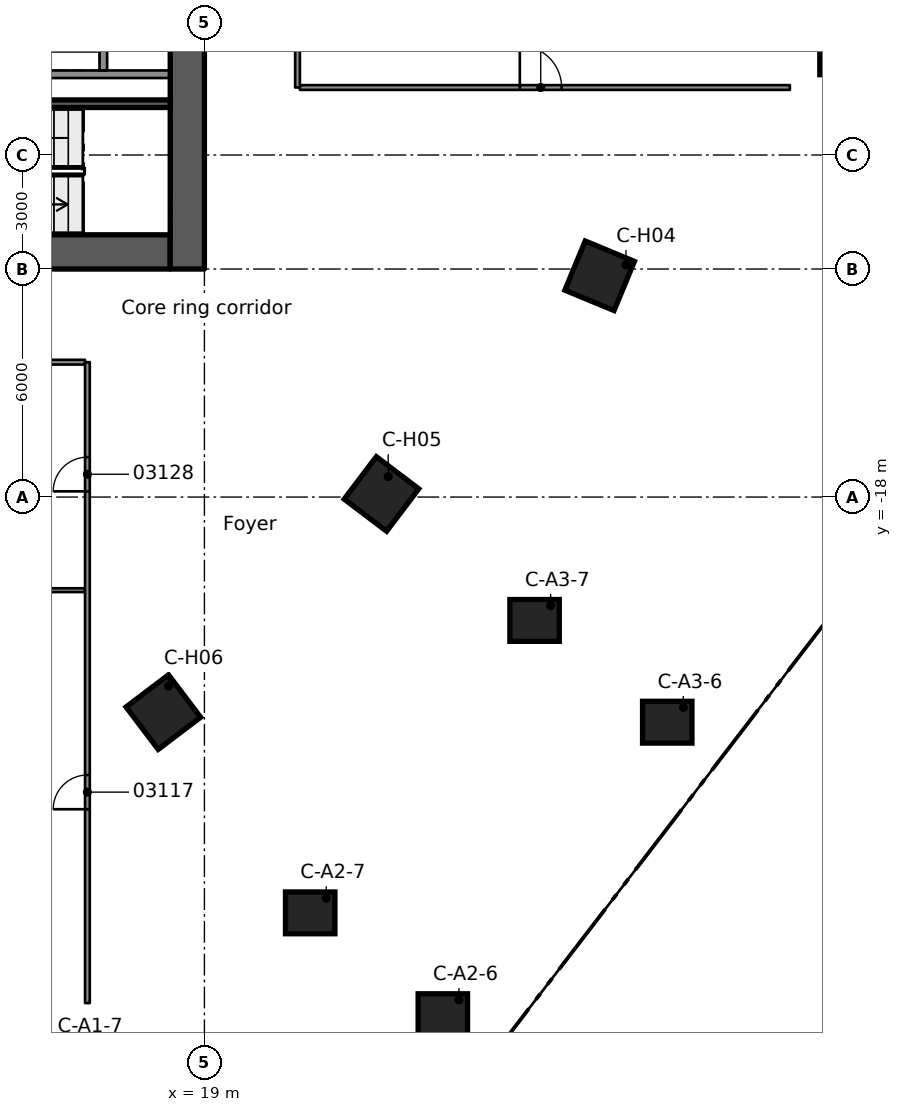
"""IFC4 building model, lengths in metres.
Left out: names, types, materials, properties, quantities, classifications, styles, units other than length and angle.
Written with IfcOpenShell. Run it as: python <this file> out.ifc"""

import sys

from ifc_helpers import new_model, si_unit, direction, frame, frame_2d, origin, origin_2d, place, context, subcontext, project, spatial, rectangle, extrude, element, fill, save


model = new_model("IFC4")
c1 = context("Model", 3, precision=1e-05, world=origin(), true_north=direction((0.0, 1.0)))
c2 = subcontext(c1, "Body", "Model", "MODEL_VIEW")
j1 = project(units=[si_unit("LENGTHUNIT", "METRE"), si_unit("PLANEANGLEUNIT", "RADIAN")], contexts=[c1])
p1 = place(None, origin())
s1 = spatial("IfcSite", under=j1, at=p1, CompositionType="ELEMENT")
p2 = place(p1, origin())
s2 = spatial("IfcBuilding", under=s1, at=p2, CompositionType="ELEMENT")
p3 = place(p2, frame((0.0, 0.0, 15.5)))
s3 = spatial("IfcBuildingStorey", under=s2, at=p3, CompositionType="ELEMENT", Elevation=15.5)
p4 = place(p3, frame((8.9, -11.55, 0.0), z_axis=(0.0, 0.0, 1.0), x_axis=(1.0, 0.0, 0.0)))
e1 = element("IfcWall", 1, at=p4, inside=s3, PredefinedType="SHEAR", context=c2, shape_type="SweptSolid", body=[
    extrude(rectangle(XDim=9.2, YDim=0.9, at=frame_2d((4.6, 0.0))), origin(), (0.0, 0.0, 1.0), 5.0),
])
p5 = place(p4, frame((3.0, 0.0, 0.0)))
e2 = element("IfcOpeningElement", 2, at=p5, cuts=e1, PredefinedType="OPENING", context=c2, shape_type="SweptSolid", body=[
    extrude(rectangle(XDim=1.1, YDim=2.1, at=frame_2d((0.55, 1.05))), frame((0.0, 0.46, 0.0), z_axis=(0.0, -1.0, 0.0), x_axis=(1.0, 0.0, 0.0)), (0.0, 0.0, 1.0), 0.92),
])
p6 = place(p3, frame((18.55, -12.0, 0.0), z_axis=(0.0, 0.0, 1.0), x_axis=(0.0, 1.0, 0.0)))
e3 = element("IfcWall", 3, at=p6, inside=s3, PredefinedType="SHEAR", context=c2, shape_type="SweptSolid", body=[
    extrude(rectangle(XDim=24.0, YDim=0.9, at=frame_2d((12.0, 0.0))), origin(), (0.0, 0.0, 1.0), 5.0),
])
p7 = place(p6, frame((12.1, 0.0, 0.0)))
e4 = element("IfcOpeningElement", 4, at=p7, cuts=e3, PredefinedType="OPENING", context=c2, shape_type="SweptSolid", body=[
    extrude(rectangle(XDim=1.8, YDim=2.1, at=frame_2d((0.9, 1.05))), frame((0.0, 0.46, 0.0), z_axis=(0.0, -1.0, 0.0), x_axis=(1.0, 0.0, 0.0)), (0.0, 0.0, 1.0), 0.92),
])
for number, where, z_axis, x_axis in (
    (5, (25.274, -31.62, 0.0), (0.0, 0.0, 1.0), (1.0, 0.0, 0.0)),
    (6, (21.783, -28.941, 0.0), (0.0, 0.0, 1.0), (1.0, 0.0, 0.0)),
    (7, (31.179, -23.924, 0.0), (0.0, 0.0, 1.0), (1.0, 0.0, 0.0)),
    (8, (27.688, -21.246, 0.0), (0.0, 0.0, 1.0), (1.0, 0.0, 0.0)),
    (9, (35.843, -6.336, 0.0), (0.0, 0.0, 1.0), (1.0, 0.0, 0.0)),
):
    element("IfcColumn", number, at=place(p3, frame(where, z_axis=z_axis, x_axis=x_axis)), inside=s3, PredefinedType="COLUMN", context=c2, shape_type="SweptSolid", body=[
        extrude(rectangle(XDim=1.3, YDim=1.1, at=origin_2d()), origin(), (0.0, 0.0, 1.0), 5.0),
    ])
for number, where, z_axis, x_axis in (
    (10, (29.4, -12.178, 0.0), (0.0, 0.0, 1.0), (0.924, -0.383, 0.0)),
    (11, (23.659, -17.919, 0.0), (0.0, 0.0, 1.0), (0.797, -0.604, 0.0)),
    (12, (17.919, -23.659, 0.0), (0.0, 0.0, 1.0), (0.604, -0.797, 0.0)),
):
    element("IfcColumn", number, at=place(p3, frame(where, z_axis=z_axis, x_axis=x_axis)), inside=s3, PredefinedType="COLUMN", context=c2, shape_type="SweptSolid", body=[
        extrude(rectangle(XDim=1.4, YDim=1.4, at=origin_2d()), origin(), (0.0, 0.0, 1.0), 5.0),
    ])
p8 = place(p3, frame((11.54, -6.875, 0.0), z_axis=(0.0, 0.0, 1.0), x_axis=(1.0, 0.0, 0.0)))
e13 = element("IfcWall", 13, at=p8, inside=s3, PredefinedType="SOLIDWALL", context=c2, shape_type="SweptSolid", body=[
    extrude(rectangle(XDim=6.56, YDim=0.2, at=frame_2d((3.28, 0.0))), origin(), (0.0, 0.0, 1.0), 4.59),
])
p9 = place(p3, frame((16.34, -4.025, 0.0), z_axis=(0.0, 0.0, 1.0), x_axis=(0.0, -1.0, 0.0)))
e14 = element("IfcWall", 14, at=p9, inside=s3, PredefinedType="SOLIDWALL", context=c2, shape_type="SweptSolid", body=[
    extrude(rectangle(XDim=2.75, YDim=0.2, at=frame_2d((1.375, 0.0))), origin(), (0.0, 0.0, 1.0), 4.59),
])
p10 = place(p9, frame((0.925, 0.0, 0.0)))
e15 = element("IfcOpeningElement", 15, at=p10, cuts=e14, PredefinedType="OPENING", context=c2, shape_type="SweptSolid", body=[
    extrude(rectangle(XDim=1.1, YDim=2.1, at=frame_2d((0.55, 1.05))), frame((0.0, 0.11, 0.0), z_axis=(0.0, -1.0, 0.0), x_axis=(1.0, 0.0, 0.0)), (0.0, 0.0, 1.0), 0.22),
])
p11 = place(p3, frame((11.54, -7.65, 0.0), z_axis=(0.0, 0.0, 1.0), x_axis=(1.0, 0.0, 0.0)))
e16 = element("IfcWall", 16, at=p11, inside=s3, PredefinedType="SOLIDWALL", context=c2, shape_type="SweptSolid", body=[
    extrude(rectangle(XDim=6.56, YDim=0.2, at=frame_2d((3.28, 0.0))), origin(), (0.0, 0.0, 1.0), 4.59),
])
p12 = place(p2, frame((0.0, 0.0, 10.5)))
s4 = spatial("IfcBuildingStorey", under=s2, at=p12, CompositionType="ELEMENT", Elevation=10.5)
p13 = place(p12, frame((34.11, -31.215, 0.0), z_axis=(0.0, 0.0, 1.0), x_axis=(0.793317087908, -0.608808671121, 0.0)))
e17 = element("IfcWall", 17, at=p13, inside=s4, PredefinedType="PARTITIONING", context=c2, shape_type="SweptSolid", body=[
    extrude(rectangle(XDim=3.886, YDim=0.1, at=frame_2d((1.943, 0.0))), origin(), (0.0, 0.0, 1.0), 9.6),
])
p14 = place(p12, frame((51.571, -17.393, 0.0), z_axis=(0.0, 0.0, 1.0), x_axis=(-0.608824368929, -0.793305040825, 0.0)))
e18 = element("IfcWall", 18, at=p14, inside=s4, PredefinedType="PARTITIONING", context=c2, shape_type="SweptSolid", body=[
    extrude(rectangle(XDim=35.196, YDim=0.1, at=frame_2d((17.598, 0.0))), origin(), (0.0, 0.0, 1.0), 9.6),
])
p15 = place(p14, frame((21.197, 0.0, 0.0)))
e19 = element("IfcOpeningElement", 19, at=p15, cuts=e18, PredefinedType="OPENING", context=c2, shape_type="SweptSolid", body=[
    extrude(rectangle(XDim=0.9, YDim=2.1, at=frame_2d((0.45, 1.05))), frame((0.0, 0.06, 0.0), z_axis=(0.0, -1.0, 0.0), x_axis=(1.0, 0.0, 0.0)), (0.0, 0.0, 1.0), 0.12),
])
p16 = place(p14, frame((17.197, 0.0, 0.0)))
e20 = element("IfcOpeningElement", 20, at=p16, cuts=e18, PredefinedType="OPENING", context=c2, shape_type="SweptSolid", body=[
    extrude(rectangle(XDim=0.9, YDim=2.1, at=frame_2d((0.45, 1.05))), frame((0.0, 0.06, 0.0), z_axis=(0.0, -1.0, 0.0), x_axis=(1.0, 0.0, 0.0)), (0.0, 0.0, 1.0), 0.12),
])
p17 = place(p14, frame((30.946, 0.0, 0.0)))
e21 = element("IfcOpeningElement", 21, at=p17, cuts=e18, PredefinedType="OPENING", context=c2, shape_type="SweptSolid", body=[
    extrude(rectangle(XDim=0.9, YDim=2.1, at=frame_2d((0.45, 1.05))), frame((0.0, 0.06, 0.0), z_axis=(0.0, -1.0, 0.0), x_axis=(1.0, 0.0, 0.0)), (0.0, 0.0, 1.0), 0.12),
])
p18 = place(p14, frame((3.346, 0.0, 0.0)))
e22 = element("IfcOpeningElement", 22, at=p18, cuts=e18, PredefinedType="OPENING", context=c2, shape_type="SweptSolid", body=[
    extrude(rectangle(XDim=0.9, YDim=2.1, at=frame_2d((0.45, 1.05))), frame((0.0, 0.06, 0.0), z_axis=(0.0, -1.0, 0.0), x_axis=(1.0, 0.0, 0.0)), (0.0, 0.0, 1.0), 0.12),
])
p19 = place(p12, frame((38.929, -24.831, 0.0), z_axis=(0.0, 0.0, 1.0), x_axis=(-0.608738381153, -0.793371025001, 0.0)))
e23 = element("IfcWall", 23, at=p19, inside=s4, PredefinedType="PARTITIONING", context=c2, shape_type="SweptSolid", body=[
    extrude(rectangle(XDim=15.599, YDim=0.125, at=frame_2d((7.8, 0.0))), origin(), (0.0, 0.0, 1.0), 9.6),
])
p20 = place(p19, frame((3.599, 0.0, 0.0)))
e24 = element("IfcOpeningElement", 24, at=p20, cuts=e23, PredefinedType="OPENING", context=c2, shape_type="SweptSolid", body=[
    extrude(rectangle(XDim=0.9, YDim=2.1, at=frame_2d((0.45, 1.05))), frame((0.0, 0.073, 0.0), z_axis=(0.0, -1.0, 0.0), x_axis=(1.0, 0.0, 0.0)), (0.0, 0.0, 1.0), 0.145),
])
p21 = place(p19, frame((10.849, 0.0, 0.0)))
e25 = element("IfcOpeningElement", 25, at=p21, cuts=e23, PredefinedType="OPENING", context=c2, shape_type="SweptSolid", body=[
    extrude(rectangle(XDim=2.1, YDim=2.1, at=frame_2d((1.05, 1.05))), frame((0.0, 0.073, 0.0), z_axis=(0.0, -1.0, 0.0), x_axis=(1.0, 0.0, 0.0)), (0.0, 0.0, 1.0), 0.145),
])
p22 = place(p3, frame((11.973, -20.45, 0.0), z_axis=(0.0, 0.0, 1.0), x_axis=(1.0, 0.0, 0.0)))
e26 = element("IfcWall", 26, at=p22, inside=s3, PredefinedType="PARTITIONING", context=c2, shape_type="SweptSolid", body=[
    extrude(rectangle(XDim=3.885, YDim=0.1, at=frame_2d((1.942, 0.0))), origin(), (0.0, 0.0, 1.0), 4.58),
])
p23 = place(p3, frame((10.391, -14.451, 0.0), z_axis=(0.0, 0.0, 1.0), x_axis=(1.0, 0.0, 0.0)))
e27 = element("IfcWall", 27, at=p23, inside=s3, PredefinedType="PARTITIONING", context=c2, shape_type="SweptSolid", body=[
    extrude(rectangle(XDim=5.467, YDim=0.125, at=frame_2d((2.733, 0.0))), origin(), (0.0, 0.0, 1.0), 4.58),
])
p24 = place(p3, frame((21.512, -7.224, 0.0), z_axis=(0.0, 0.0, 1.0), x_axis=(1.0, 0.0, 0.0)))
e28 = element("IfcWall", 28, at=p24, inside=s3, PredefinedType="PARTITIONING", context=c2, shape_type="SweptSolid", body=[
    extrude(rectangle(XDim=12.894, YDim=0.125, at=frame_2d((6.447, 0.0))), origin(), (0.0, 0.0, 1.0), 4.58),
])
p25 = place(p24, frame((5.788, 0.0, 0.0)))
e29 = element("IfcOpeningElement", 29, at=p25, cuts=e28, PredefinedType="OPENING", context=c2, shape_type="SweptSolid", body=[
    extrude(rectangle(XDim=1.1, YDim=2.1, at=frame_2d((0.55, 1.05))), frame((0.0, 0.073, 0.0), z_axis=(0.0, -1.0, 0.0), x_axis=(1.0, 0.0, 0.0)), (0.0, 0.0, 1.0), 0.145),
])
p26 = place(p3, frame((21.45, 14.451, 0.0), z_axis=(0.0, 0.0, 1.0), x_axis=(0.0, -1.0, 0.0)))
e30 = element("IfcWall", 30, at=p26, inside=s3, PredefinedType="PARTITIONING", context=c2, shape_type="SweptSolid", body=[
    extrude(rectangle(XDim=21.675, YDim=0.125, at=frame_2d((10.837, 0.0))), origin(), (0.0, 0.0, 1.0), 4.58),
])
p27 = place(p26, frame((10.327, 0.0, 0.0)))
e31 = element("IfcOpeningElement", 31, at=p27, cuts=e30, PredefinedType="OPENING", context=c2, shape_type="SweptSolid", body=[
    extrude(rectangle(XDim=1.1, YDim=2.1, at=frame_2d((0.55, 1.05))), frame((0.0, 0.073, 0.0), z_axis=(0.0, -1.0, 0.0), x_axis=(1.0, 0.0, 0.0)), (0.0, 0.0, 1.0), 0.145),
])
p28 = place(p3, frame((15.921, -31.314, 0.0), z_axis=(0.0, 0.0, 1.0), x_axis=(0.0, 1.0, 0.0)))
e32 = element("IfcWall", 32, at=p28, inside=s3, PredefinedType="PARTITIONING", context=c2, shape_type="SweptSolid", body=[
    extrude(rectangle(XDim=16.863, YDim=0.125, at=frame_2d((8.432, 0.0))), origin(), (0.0, 0.0, 1.0), 4.58),
])
p29 = place(p28, frame((5.1, 0.0, 0.0)))
e33 = element("IfcOpeningElement", 33, at=p29, cuts=e32, PredefinedType="OPENING", context=c2, shape_type="SweptSolid", body=[
    extrude(rectangle(XDim=0.9, YDim=2.1, at=frame_2d((0.45, 1.05))), frame((0.0, 0.073, 0.0), z_axis=(0.0, -1.0, 0.0), x_axis=(1.0, 0.0, 0.0)), (0.0, 0.0, 1.0), 0.145),
])
p30 = place(p28, frame((13.464, 0.0, 0.0)))
e34 = element("IfcOpeningElement", 34, at=p30, cuts=e32, PredefinedType="OPENING", context=c2, shape_type="SweptSolid", body=[
    extrude(rectangle(XDim=0.9, YDim=2.1, at=frame_2d((0.45, 1.05))), frame((0.0, 0.073, 0.0), z_axis=(0.0, -1.0, 0.0), x_axis=(1.0, 0.0, 0.0)), (0.0, 0.0, 1.0), 0.145),
])
p31 = place(p29, origin())
e35 = element("IfcDoor", 35, at=p31, inside=s3, OperationType="SINGLE_SWING_LEFT", PredefinedType="DOOR", context=c2, shape_type="SweptSolid", body=[
    extrude(rectangle(XDim=0.9, YDim=2.1, at=frame_2d((0.45, 1.05))), frame((0.0, 0.025, 0.0), z_axis=(0.0, -1.0, 0.0), x_axis=(1.0, 0.0, 0.0)), (0.0, 0.0, 1.0), 0.05),
])
fill(e33, e35)
p32 = place(p25, origin())
e36 = element("IfcDoor", 36, at=p32, inside=s3, OperationType="SINGLE_SWING_LEFT", PredefinedType="DOOR", context=c2, shape_type="SweptSolid", body=[
    extrude(rectangle(XDim=1.1, YDim=2.1, at=frame_2d((0.55, 1.05))), frame((0.0, 0.025, 0.0), z_axis=(0.0, -1.0, 0.0), x_axis=(1.0, 0.0, 0.0)), (0.0, 0.0, 1.0), 0.05),
])
fill(e29, e36)
p33 = place(p30, origin())
e37 = element("IfcDoor", 37, at=p33, inside=s3, OperationType="SINGLE_SWING_RIGHT", PredefinedType="DOOR", context=c2, shape_type="SweptSolid", body=[
    extrude(rectangle(XDim=0.9, YDim=2.1, at=frame_2d((0.45, 1.05))), frame((0.0, 0.025, 0.0), z_axis=(0.0, -1.0, 0.0), x_axis=(1.0, 0.0, 0.0)), (0.0, 0.0, 1.0), 0.05),
])
fill(e34, e37)
save(model, sys.argv[1])
